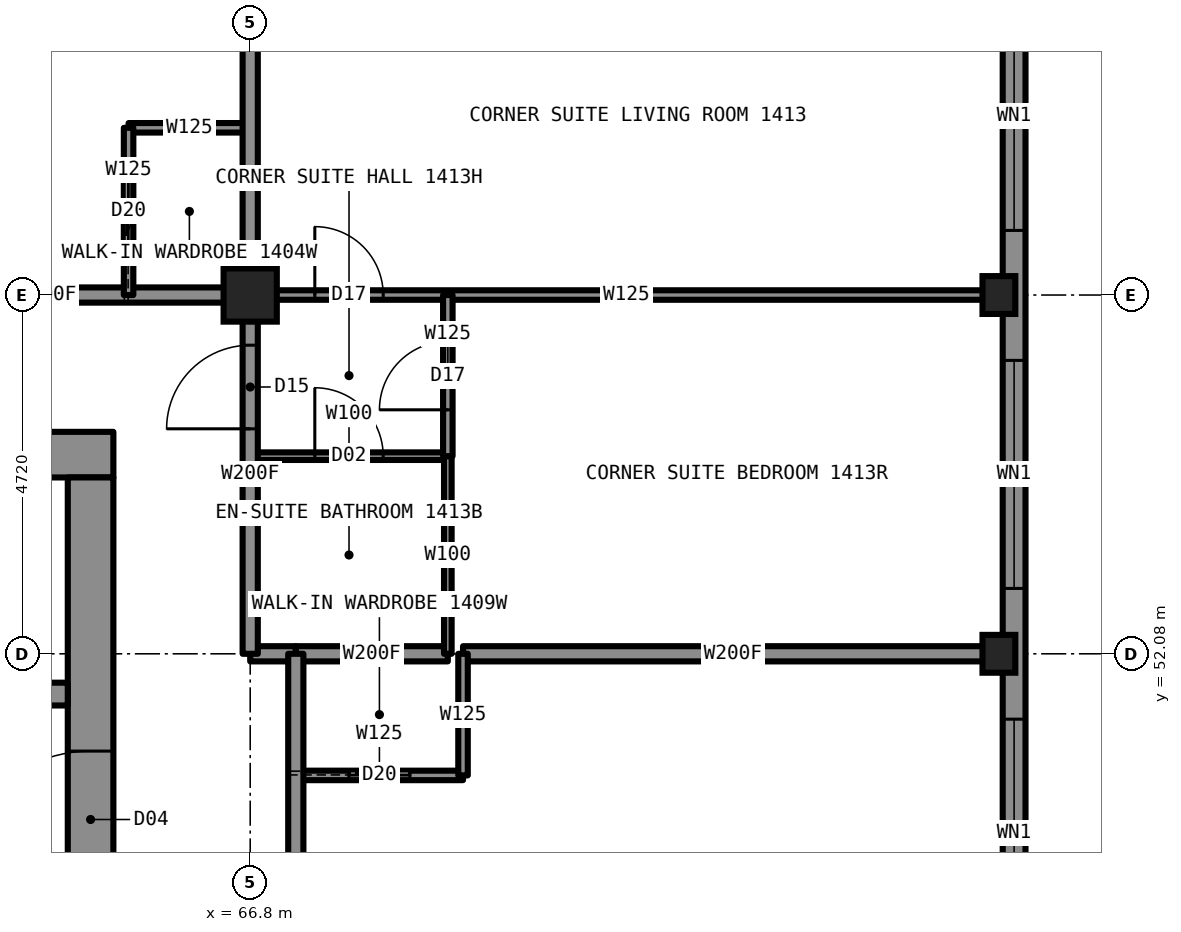
"""IFC4 building model, lengths in metres.
Left out: names, types, materials, properties, quantities, classifications, styles, units other than length and angle.
Written with IfcOpenShell. Run it as: python <this file> out.ifc"""

import sys

from ifc_helpers import new_model, si_unit, direction, frame, frame_2d, origin, origin_2d, place, context, subcontext, project, spatial, rectangle, hollow_rectangle, i_section, extrude, element, fill, save


model = new_model("IFC4")
c1 = context("Model", 3, precision=1e-05, world=origin(), true_north=direction((0.0, 1.0)))
c2 = subcontext(c1, "Body", "Model", "MODEL_VIEW")
j1 = project(units=[si_unit("LENGTHUNIT", "METRE"), si_unit("PLANEANGLEUNIT", "RADIAN")], contexts=[c1])
p1 = place(None, origin())
s1 = spatial("IfcSite", under=j1, at=p1, CompositionType="ELEMENT")
p2 = place(p1, origin())
s2 = spatial("IfcBuilding", under=s1, at=p2, CompositionType="ELEMENT")
p3 = place(p2, frame((0.0, 0.0, 49.5)))
s3 = spatial("IfcBuildingStorey", under=s2, at=p3, CompositionType="ELEMENT", Elevation=49.5)
for number, where, z_axis, x_axis in (
    (1, (76.65, 52.08, 0.0), (0.0, 0.0, 1.0), (1.0, 0.0, 0.0)),
    (2, (76.65, 56.8, 0.0), (0.0, 0.0, 1.0), (1.0, 0.0, 0.0)),
):
    element("IfcColumn", number, at=place(p3, frame(where, z_axis=z_axis, x_axis=x_axis)), inside=s3, PredefinedType="COLUMN", context=c2, shape_type="SweptSolid", body=[
        extrude(i_section(OverallWidth=0.432, OverallDepth=0.498, WebThickness=0.056, FlangeThickness=0.089, at=origin_2d()), origin(), (0.0, 0.0, 1.0), 3.5),
    ])
p4 = place(p3, frame((66.8, 56.8, 0.0), z_axis=(0.0, 0.0, 1.0), x_axis=(1.0, 0.0, 0.0)))
e3 = element("IfcColumn", 3, at=p4, inside=s3, PredefinedType="COLUMN", context=c2, shape_type="SweptSolid", body=[
    extrude(hollow_rectangle(XDim=0.7, YDim=0.7, WallThickness=0.06, at=origin_2d()), origin(), (0.0, 0.0, 1.0), 3.5),
])
p5 = place(p3, frame((45.0, 54.7, 0.0), z_axis=(0.0, 0.0, 1.0), x_axis=(1.0, 0.0, 0.0)))
e4 = element("IfcWall", 4, at=p5, inside=s3, PredefinedType="SHEAR", context=c2, shape_type="SweptSolid", body=[
    extrude(rectangle(XDim=20.0, YDim=0.6, at=frame_2d((10.0, 0.0))), origin(), (0.0, 0.0, 1.0), 3.5),
])
p6 = place(p3, frame((64.7, 35.6, 0.0), z_axis=(0.0, 0.0, 1.0), x_axis=(0.0, 1.0, 0.0)))
e5 = element("IfcWall", 5, at=p6, inside=s3, PredefinedType="SHEAR", context=c2, shape_type="SweptSolid", body=[
    extrude(rectangle(XDim=18.8, YDim=0.6, at=frame_2d((9.4, 0.0))), origin(), (0.0, 0.0, 1.0), 3.5),
])
p7 = place(p6, frame((13.4, 0.0, 0.0)))
e6 = element("IfcOpeningElement", 6, at=p7, cuts=e5, PredefinedType="OPENING", context=c2, shape_type="SweptSolid", body=[
    extrude(rectangle(XDim=1.8, YDim=2.2, at=frame_2d((0.9, 1.1))), frame((0.0, 0.31, 0.0), z_axis=(0.0, -1.0, 0.0), x_axis=(1.0, 0.0, 0.0)), (0.0, 0.0, 1.0), 0.62),
])
p8 = place(p6, frame((3.6, 0.0, 0.0)))
e7 = element("IfcOpeningElement", 7, at=p8, cuts=e5, PredefinedType="OPENING", context=c2, shape_type="SweptSolid", body=[
    extrude(rectangle(XDim=1.8, YDim=2.2, at=frame_2d((0.9, 1.1))), frame((0.0, 0.31, 0.0), z_axis=(0.0, -1.0, 0.0), x_axis=(1.0, 0.0, 0.0)), (0.0, 0.0, 1.0), 0.62),
])
p9 = place(p3, frame((45.6, 51.55, 0.0), z_axis=(0.0, 0.0, 1.0), x_axis=(1.0, 0.0, 0.0)))
e8 = element("IfcWall", 8, at=p9, inside=s3, PredefinedType="SHEAR", context=c2, shape_type="SweptSolid", body=[
    extrude(rectangle(XDim=18.8, YDim=0.3, at=frame_2d((9.4, 0.0))), origin(), (0.0, 0.0, 1.0), 3.5),
])
p10 = place(p9, frame((0.7, 0.0, 0.0)))
e9 = element("IfcOpeningElement", 9, at=p10, cuts=e8, PredefinedType="OPENING", context=c2, shape_type="SweptSolid", body=[
    extrude(rectangle(XDim=1.1, YDim=2.2, at=frame_2d((0.55, 1.1))), frame((0.0, 0.16, 0.0), z_axis=(0.0, -1.0, 0.0), x_axis=(1.0, 0.0, 0.0)), (0.0, 0.0, 1.0), 0.32),
])
p11 = place(p9, frame((3.4, 0.0, 0.0)))
e10 = element("IfcOpeningElement", 10, at=p11, cuts=e8, PredefinedType="OPENING", context=c2, shape_type="SweptSolid", body=[
    extrude(rectangle(XDim=1.1, YDim=2.2, at=frame_2d((0.55, 1.1))), frame((0.0, 0.16, 0.0), z_axis=(0.0, -1.0, 0.0), x_axis=(1.0, 0.0, 0.0)), (0.0, 0.0, 1.0), 0.32),
])
p12 = place(p9, frame((6.1, 0.0, 0.0)))
e11 = element("IfcOpeningElement", 11, at=p12, cuts=e8, PredefinedType="OPENING", context=c2, shape_type="SweptSolid", body=[
    extrude(rectangle(XDim=1.1, YDim=2.2, at=frame_2d((0.55, 1.1))), frame((0.0, 0.16, 0.0), z_axis=(0.0, -1.0, 0.0), x_axis=(1.0, 0.0, 0.0)), (0.0, 0.0, 1.0), 0.32),
])
p13 = place(p9, frame((8.8, 0.0, 0.0)))
e12 = element("IfcOpeningElement", 12, at=p13, cuts=e8, PredefinedType="OPENING", context=c2, shape_type="SweptSolid", body=[
    extrude(rectangle(XDim=1.1, YDim=2.2, at=frame_2d((0.55, 1.1))), frame((0.0, 0.16, 0.0), z_axis=(0.0, -1.0, 0.0), x_axis=(1.0, 0.0, 0.0)), (0.0, 0.0, 1.0), 0.32),
])
p14 = place(p9, frame((11.6, 0.0, 0.0)))
e13 = element("IfcOpeningElement", 13, at=p14, cuts=e8, PredefinedType="OPENING", context=c2, shape_type="SweptSolid", body=[
    extrude(rectangle(XDim=1.1, YDim=2.2, at=frame_2d((0.55, 1.1))), frame((0.0, 0.16, 0.0), z_axis=(0.0, -1.0, 0.0), x_axis=(1.0, 0.0, 0.0)), (0.0, 0.0, 1.0), 0.32),
])
p15 = place(p9, frame((14.3, 0.0, 0.0)))
e14 = element("IfcOpeningElement", 14, at=p15, cuts=e8, PredefinedType="OPENING", context=c2, shape_type="SweptSolid", body=[
    extrude(rectangle(XDim=1.1, YDim=2.2, at=frame_2d((0.55, 1.1))), frame((0.0, 0.16, 0.0), z_axis=(0.0, -1.0, 0.0), x_axis=(1.0, 0.0, 0.0)), (0.0, 0.0, 1.0), 0.32),
])
p16 = place(p3, frame((43.2, 56.8, 0.0), z_axis=(0.0, 0.0, 1.0), x_axis=(1.0, 0.0, 0.0)))
e15 = element("IfcWall", 15, at=p16, inside=s3, PredefinedType="PARTITIONING", context=c2, shape_type="SweptSolid", body=[
    extrude(rectangle(XDim=23.6, YDim=0.2, at=frame_2d((11.8, 0.0))), origin(), (0.0, 0.0, 1.0), 3.33),
])
p17 = place(p16, frame((1.46, 0.0, 0.0)))
e16 = element("IfcOpeningElement", 16, at=p17, cuts=e15, PredefinedType="OPENING", context=c2, shape_type="SweptSolid", body=[
    extrude(rectangle(XDim=1.0, YDim=2.2, at=frame_2d((0.5, 1.1))), frame((0.0, 0.11, 0.0), z_axis=(0.0, -1.0, 0.0), x_axis=(1.0, 0.0, 0.0)), (0.0, 0.0, 1.0), 0.22),
])
p18 = place(p16, frame((7.27, 0.0, 0.0)))
e17 = element("IfcOpeningElement", 17, at=p18, cuts=e15, PredefinedType="OPENING", context=c2, shape_type="SweptSolid", body=[
    extrude(rectangle(XDim=1.0, YDim=2.2, at=frame_2d((0.5, 1.1))), frame((0.0, 0.11, 0.0), z_axis=(0.0, -1.0, 0.0), x_axis=(1.0, 0.0, 0.0)), (0.0, 0.0, 1.0), 0.22),
])
p19 = place(p16, frame((11.7, 0.0, 0.0)))
e18 = element("IfcOpeningElement", 18, at=p19, cuts=e15, PredefinedType="OPENING", context=c2, shape_type="SweptSolid", body=[
    extrude(rectangle(XDim=1.0, YDim=2.2, at=frame_2d((0.5, 1.1))), frame((0.0, 0.11, 0.0), z_axis=(0.0, -1.0, 0.0), x_axis=(1.0, 0.0, 0.0)), (0.0, 0.0, 1.0), 0.22),
])
p20 = place(p16, frame((17.16, 0.0, 0.0)))
e19 = element("IfcOpeningElement", 19, at=p20, cuts=e15, PredefinedType="OPENING", context=c2, shape_type="SweptSolid", body=[
    extrude(rectangle(XDim=1.0, YDim=2.2, at=frame_2d((0.5, 1.1))), frame((0.0, 0.11, 0.0), z_axis=(0.0, -1.0, 0.0), x_axis=(1.0, 0.0, 0.0)), (0.0, 0.0, 1.0), 0.22),
])
p21 = place(p3, frame((66.8, 56.8, 0.0), z_axis=(0.0, 0.0, 1.0), x_axis=(1.0, 0.0, 0.0)))
e20 = element("IfcWall", 20, at=p21, inside=s3, PredefinedType="PARTITIONING", context=c2, shape_type="SweptSolid", body=[
    extrude(rectangle(XDim=9.9, YDim=0.125, at=frame_2d((4.95, 0.0))), origin(), (0.0, 0.0, 1.0), 2.573),
])
p22 = place(p21, frame((0.85, 0.0, 0.0)))
e21 = element("IfcOpeningElement", 21, at=p22, cuts=e20, PredefinedType="OPENING", context=c2, shape_type="SweptSolid", body=[
    extrude(rectangle(XDim=0.9, YDim=2.2, at=frame_2d((0.45, 1.1))), frame((0.0, 0.073, 0.0), z_axis=(0.0, -1.0, 0.0), x_axis=(1.0, 0.0, 0.0)), (0.0, 0.0, 1.0), 0.145),
])
p23 = place(p3, frame((65.2, 59.0, 0.0), z_axis=(0.0, 0.0, 1.0), x_axis=(1.0, 0.0, 0.0)))
e22 = element("IfcWall", 22, at=p23, inside=s3, PredefinedType="PARTITIONING", context=c2, shape_type="SweptSolid", body=[
    extrude(rectangle(XDim=1.6, YDim=0.125, at=frame_2d((0.8, 0.0))), origin(), (0.0, 0.0, 1.0), 3.33),
])
p24 = place(p3, frame((67.4, 50.48, 0.0), z_axis=(0.0, 0.0, 1.0), x_axis=(1.0, 0.0, 0.0)))
e23 = element("IfcWall", 23, at=p24, inside=s3, PredefinedType="PARTITIONING", context=c2, shape_type="SweptSolid", body=[
    extrude(rectangle(XDim=2.2, YDim=0.125, at=frame_2d((1.1, 0.0))), origin(), (0.0, 0.0, 1.0), 3.33),
])
p25 = place(p24, frame((0.7, 0.0, 0.0)))
e24 = element("IfcOpeningElement", 24, at=p25, cuts=e23, PredefinedType="OPENING", context=c2, shape_type="SweptSolid", body=[
    extrude(rectangle(XDim=0.8, YDim=2.1, at=frame_2d((0.4, 1.05))), frame((0.0, 0.073, 0.0), z_axis=(0.0, -1.0, 0.0), x_axis=(1.0, 0.0, 0.0)), (0.0, 0.0, 1.0), 0.145),
])
p26 = place(p3, frame((66.8, 52.08, 0.0), z_axis=(0.0, 0.0, 1.0), x_axis=(1.0, 0.0, 0.0)))
e25 = element("IfcWall", 25, at=p26, inside=s3, PredefinedType="PARTITIONING", context=c2, shape_type="SweptSolid", body=[
    extrude(rectangle(XDim=0.6, YDim=0.2, at=frame_2d((0.3, 0.0))), origin(), (0.0, 0.0, 1.0), 2.573),
])
p27 = place(p3, frame((67.4, 52.08, 0.0), z_axis=(0.0, 0.0, 1.0), x_axis=(1.0, 0.0, 0.0)))
e26 = element("IfcWall", 26, at=p27, inside=s3, PredefinedType="PARTITIONING", context=c2, shape_type="SweptSolid", body=[
    extrude(rectangle(XDim=2.0, YDim=0.2, at=frame_2d((1.0, 0.0))), origin(), (0.0, 0.0, 1.0), 2.573),
])
p28 = place(p3, frame((69.6, 52.08, 0.0), z_axis=(0.0, 0.0, 1.0), x_axis=(1.0, 0.0, 0.0)))
e27 = element("IfcWall", 27, at=p28, inside=s3, PredefinedType="PARTITIONING", context=c2, shape_type="SweptSolid", body=[
    extrude(rectangle(XDim=7.1, YDim=0.2, at=frame_2d((3.55, 0.0))), origin(), (0.0, 0.0, 1.0), 2.573),
])
p29 = place(p3, frame((66.8, 54.68, 0.0), z_axis=(0.0, 0.0, 1.0), x_axis=(1.0, 0.0, 0.0)))
e28 = element("IfcWall", 28, at=p29, inside=s3, PredefinedType="PARTITIONING", context=c2, shape_type="SweptSolid", body=[
    extrude(rectangle(XDim=2.6, YDim=0.1, at=frame_2d((1.3, 0.0))), origin(), (0.0, 0.0, 1.0), 3.33),
])
p30 = place(p29, frame((0.85, 0.0, 0.0)))
e29 = element("IfcOpeningElement", 29, at=p30, cuts=e28, PredefinedType="OPENING", context=c2, shape_type="SweptSolid", body=[
    extrude(rectangle(XDim=0.9, YDim=2.1, at=frame_2d((0.45, 1.05))), frame((0.0, 0.06, 0.0), z_axis=(0.0, -1.0, 0.0), x_axis=(1.0, 0.0, 0.0)), (0.0, 0.0, 1.0), 0.12),
])
p31 = place(p3, frame((65.2, 56.8, 0.0), z_axis=(0.0, 0.0, 1.0), x_axis=(0.0, 1.0, 0.0)))
e30 = element("IfcWall", 30, at=p31, inside=s3, PredefinedType="PARTITIONING", context=c2, shape_type="SweptSolid", body=[
    extrude(rectangle(XDim=2.2, YDim=0.125, at=frame_2d((1.1, 0.0))), origin(), (0.0, 0.0, 1.0), 3.33),
])
p32 = place(p31, frame((0.7, 0.0, 0.0)))
e31 = element("IfcOpeningElement", 31, at=p32, cuts=e30, PredefinedType="OPENING", context=c2, shape_type="SweptSolid", body=[
    extrude(rectangle(XDim=0.8, YDim=2.1, at=frame_2d((0.4, 1.05))), frame((0.0, 0.073, 0.0), z_axis=(0.0, -1.0, 0.0), x_axis=(1.0, 0.0, 0.0)), (0.0, 0.0, 1.0), 0.145),
])
p33 = place(p3, frame((66.8, 52.08, 0.0), z_axis=(0.0, 0.0, 1.0), x_axis=(0.0, 1.0, 0.0)))
e32 = element("IfcWall", 32, at=p33, inside=s3, PredefinedType="PARTITIONING", context=c2, shape_type="SweptSolid", body=[
    extrude(rectangle(XDim=4.72, YDim=0.2, at=frame_2d((2.36, 0.0))), origin(), (0.0, 0.0, 1.0), 3.33),
])
p34 = place(p33, frame((2.96, 0.0, 0.0)))
e33 = element("IfcOpeningElement", 33, at=p34, cuts=e32, PredefinedType="OPENING", context=c2, shape_type="SweptSolid", body=[
    extrude(rectangle(XDim=1.1, YDim=2.2, at=frame_2d((0.55, 1.1))), frame((0.0, 0.11, 0.0), z_axis=(0.0, -1.0, 0.0), x_axis=(1.0, 0.0, 0.0)), (0.0, 0.0, 1.0), 0.22),
])
p35 = place(p3, frame((66.8, 56.8, 0.0), z_axis=(0.0, 0.0, 1.0), x_axis=(0.0, 1.0, 0.0)))
e34 = element("IfcWall", 34, at=p35, inside=s3, PredefinedType="PARTITIONING", context=c2, shape_type="SweptSolid", body=[
    extrude(rectangle(XDim=9.9, YDim=0.2, at=frame_2d((4.95, 0.0))), origin(), (0.0, 0.0, 1.0), 2.573),
])
p36 = place(p3, frame((67.4, 37.92, 0.0), z_axis=(0.0, 0.0, 1.0), x_axis=(0.0, 1.0, 0.0)))
e35 = element("IfcWall", 35, at=p36, inside=s3, PredefinedType="PARTITIONING", context=c2, shape_type="SweptSolid", body=[
    extrude(rectangle(XDim=14.16, YDim=0.2, at=frame_2d((7.08, 0.0))), origin(), (0.0, 0.0, 1.0), 3.33),
])
p37 = place(p36, frame((3.15, 0.0, 0.0)))
e36 = element("IfcOpeningElement", 36, at=p37, cuts=e35, PredefinedType="OPENING", context=c2, shape_type="SweptSolid", body=[
    extrude(rectangle(XDim=1.0, YDim=2.2, at=frame_2d((0.5, 1.1))), frame((0.0, 0.11, 0.0), z_axis=(0.0, -1.0, 0.0), x_axis=(1.0, 0.0, 0.0)), (0.0, 0.0, 1.0), 0.22),
])
p38 = place(p36, frame((7.72, 0.0, 0.0)))
e37 = element("IfcOpeningElement", 37, at=p38, cuts=e35, PredefinedType="OPENING", context=c2, shape_type="SweptSolid", body=[
    extrude(rectangle(XDim=1.0, YDim=2.2, at=frame_2d((0.5, 1.1))), frame((0.0, 0.11, 0.0), z_axis=(0.0, -1.0, 0.0), x_axis=(1.0, 0.0, 0.0)), (0.0, 0.0, 1.0), 0.22),
])
p39 = place(p3, frame((69.4, 52.08, 0.0), z_axis=(0.0, 0.0, 1.0), x_axis=(0.0, 1.0, 0.0)))
e38 = element("IfcWall", 38, at=p39, inside=s3, PredefinedType="PARTITIONING", context=c2, shape_type="SweptSolid", body=[
    extrude(rectangle(XDim=2.6, YDim=0.1, at=frame_2d((1.3, 0.0))), origin(), (0.0, 0.0, 1.0), 3.33),
])
p40 = place(p3, frame((69.4, 54.68, 0.0), z_axis=(0.0, 0.0, 1.0), x_axis=(0.0, 1.0, 0.0)))
e39 = element("IfcWall", 39, at=p40, inside=s3, PredefinedType="PARTITIONING", context=c2, shape_type="SweptSolid", body=[
    extrude(rectangle(XDim=2.12, YDim=0.125, at=frame_2d((1.06, 0.0))), origin(), (0.0, 0.0, 1.0), 3.33),
])
p41 = place(p40, frame((0.61, 0.0, 0.0)))
e40 = element("IfcOpeningElement", 40, at=p41, cuts=e39, PredefinedType="OPENING", context=c2, shape_type="SweptSolid", body=[
    extrude(rectangle(XDim=0.9, YDim=2.2, at=frame_2d((0.45, 1.1))), frame((0.0, 0.073, 0.0), z_axis=(0.0, -1.0, 0.0), x_axis=(1.0, 0.0, 0.0)), (0.0, 0.0, 1.0), 0.145),
])
p42 = place(p3, frame((69.6, 50.48, 0.0), z_axis=(0.0, 0.0, 1.0), x_axis=(0.0, 1.0, 0.0)))
e41 = element("IfcWall", 41, at=p42, inside=s3, PredefinedType="PARTITIONING", context=c2, shape_type="SweptSolid", body=[
    extrude(rectangle(XDim=1.6, YDim=0.125, at=frame_2d((0.8, 0.0))), origin(), (0.0, 0.0, 1.0), 3.33),
])
p43 = place(p3, frame((76.85, 28.5, 0.0), z_axis=(0.0, 0.0, 1.0), x_axis=(0.0, 1.0, 0.0)))
e42 = element("IfcWall", 42, at=p43, inside=s3, PredefinedType="SOLIDWALL", context=c2, shape_type="SweptSolid", body=[
    extrude(rectangle(XDim=33.0, YDim=0.3, at=frame_2d((16.5, 0.0))), origin(), (0.0, 0.0, 1.0), 2.83),
])
p44 = place(p43, frame((0.85, 0.0, 0.5)))
e43 = element("IfcOpeningElement", 43, at=p44, cuts=e42, PredefinedType="OPENING", context=c2, shape_type="SweptSolid", body=[
    extrude(rectangle(XDim=3.0, YDim=2.0, at=frame_2d((1.5, 1.0))), frame((0.0, 0.16, 0.0), z_axis=(0.0, -1.0, 0.0), x_axis=(1.0, 0.0, 0.0)), (0.0, 0.0, 1.0), 0.32),
])
p45 = place(p43, frame((5.56, 0.0, 0.5)))
e44 = element("IfcOpeningElement", 44, at=p45, cuts=e42, PredefinedType="OPENING", context=c2, shape_type="SweptSolid", body=[
    extrude(rectangle(XDim=3.0, YDim=2.0, at=frame_2d((1.5, 1.0))), frame((0.0, 0.16, 0.0), z_axis=(0.0, -1.0, 0.0), x_axis=(1.0, 0.0, 0.0)), (0.0, 0.0, 1.0), 0.32),
])
p46 = place(p43, frame((10.28, 0.0, 1.1)))
e45 = element("IfcOpeningElement", 45, at=p46, cuts=e42, PredefinedType="OPENING", context=c2, shape_type="SweptSolid", body=[
    extrude(rectangle(XDim=1.1, YDim=1.4, at=frame_2d((0.55, 0.7))), frame((0.0, 0.16, 0.0), z_axis=(0.0, -1.0, 0.0), x_axis=(1.0, 0.0, 0.0)), (0.0, 0.0, 1.0), 0.32),
])
p47 = place(p43, frame((15.0, 0.0, 0.5)))
e46 = element("IfcOpeningElement", 46, at=p47, cuts=e42, PredefinedType="OPENING", context=c2, shape_type="SweptSolid", body=[
    extrude(rectangle(XDim=3.0, YDim=2.0, at=frame_2d((1.5, 1.0))), frame((0.0, 0.16, 0.0), z_axis=(0.0, -1.0, 0.0), x_axis=(1.0, 0.0, 0.0)), (0.0, 0.0, 1.0), 0.32),
])
p48 = place(p43, frame((21.62, 0.0, 1.1)))
e47 = element("IfcOpeningElement", 47, at=p48, cuts=e42, PredefinedType="OPENING", context=c2, shape_type="SweptSolid", body=[
    extrude(rectangle(XDim=1.1, YDim=1.4, at=frame_2d((0.55, 0.7))), frame((0.0, 0.16, 0.0), z_axis=(0.0, -1.0, 0.0), x_axis=(1.0, 0.0, 0.0)), (0.0, 0.0, 1.0), 0.32),
])
p49 = place(p43, frame((24.44, 0.0, 0.5)))
e48 = element("IfcOpeningElement", 48, at=p49, cuts=e42, PredefinedType="OPENING", context=c2, shape_type="SweptSolid", body=[
    extrude(rectangle(XDim=3.0, YDim=2.0, at=frame_2d((1.5, 1.0))), frame((0.0, 0.16, 0.0), z_axis=(0.0, -1.0, 0.0), x_axis=(1.0, 0.0, 0.0)), (0.0, 0.0, 1.0), 0.32),
])
p50 = place(p43, frame((29.15, 0.0, 0.5)))
e49 = element("IfcOpeningElement", 49, at=p50, cuts=e42, PredefinedType="OPENING", context=c2, shape_type="SweptSolid", body=[
    extrude(rectangle(XDim=3.0, YDim=2.0, at=frame_2d((1.5, 1.0))), frame((0.0, 0.16, 0.0), z_axis=(0.0, -1.0, 0.0), x_axis=(1.0, 0.0, 0.0)), (0.0, 0.0, 1.0), 0.32),
])
p51 = place(p32, origin())
e50 = element("IfcDoor", 50, at=p51, inside=s3, OperationType="SLIDING_TO_LEFT", PredefinedType="DOOR", context=c2, shape_type="SweptSolid", body=[
    extrude(rectangle(XDim=0.8, YDim=2.1, at=frame_2d((0.4, 1.05))), frame((0.0, 0.025, 0.0), z_axis=(0.0, -1.0, 0.0), x_axis=(1.0, 0.0, 0.0)), (0.0, 0.0, 1.0), 0.05),
])
fill(e31, e50)
p52 = place(p25, origin())
e51 = element("IfcDoor", 51, at=p52, inside=s3, OperationType="SLIDING_TO_LEFT", PredefinedType="DOOR", context=c2, shape_type="SweptSolid", body=[
    extrude(rectangle(XDim=0.8, YDim=2.1, at=frame_2d((0.4, 1.05))), frame((0.0, 0.025, 0.0), z_axis=(0.0, -1.0, 0.0), x_axis=(1.0, 0.0, 0.0)), (0.0, 0.0, 1.0), 0.05),
])
fill(e24, e51)
p53 = place(p22, origin())
e52 = element("IfcDoor", 52, at=p53, inside=s3, OperationType="SINGLE_SWING_LEFT", PredefinedType="DOOR", context=c2, shape_type="SweptSolid", body=[
    extrude(rectangle(XDim=0.9, YDim=2.2, at=frame_2d((0.45, 1.1))), frame((0.0, 0.025, 0.0), z_axis=(0.0, -1.0, 0.0), x_axis=(1.0, 0.0, 0.0)), (0.0, 0.0, 1.0), 0.05),
])
fill(e21, e52)
p54 = place(p30, origin())
e53 = element("IfcDoor", 53, at=p54, inside=s3, OperationType="SINGLE_SWING_RIGHT", PredefinedType="DOOR", context=c2, shape_type="SweptSolid", body=[
    extrude(rectangle(XDim=0.9, YDim=2.1, at=frame_2d((0.45, 1.05))), frame((0.0, 0.025, 0.0), z_axis=(0.0, -1.0, 0.0), x_axis=(1.0, 0.0, 0.0)), (0.0, 0.0, 1.0), 0.05),
])
fill(e29, e53)
p55 = place(p34, origin())
e54 = element("IfcDoor", 54, at=p55, inside=s3, OperationType="SINGLE_SWING_LEFT", PredefinedType="DOOR", context=c2, shape_type="SweptSolid", body=[
    extrude(rectangle(XDim=1.1, YDim=2.2, at=frame_2d((0.55, 1.1))), frame((0.0, 0.025, 0.0), z_axis=(0.0, -1.0, 0.0), x_axis=(1.0, 0.0, 0.0)), (0.0, 0.0, 1.0), 0.05),
])
fill(e33, e54)
p56 = place(p41, origin())
e55 = element("IfcDoor", 55, at=p56, inside=s3, OperationType="SINGLE_SWING_LEFT", PredefinedType="DOOR", context=c2, shape_type="SweptSolid", body=[
    extrude(rectangle(XDim=0.9, YDim=2.2, at=frame_2d((0.45, 1.1))), frame((0.0, 0.025, 0.0), z_axis=(0.0, -1.0, 0.0), x_axis=(1.0, 0.0, 0.0)), (0.0, 0.0, 1.0), 0.05),
])
fill(e40, e55)
p57 = place(p48, origin())
e56 = element("IfcWindow", 56, at=p57, inside=s3, PartitioningType="SINGLE_PANEL", PredefinedType="WINDOW", context=c2, shape_type="SweptSolid", body=[
    extrude(rectangle(XDim=1.1, YDim=1.4, at=frame_2d((0.55, 0.7))), frame((0.0, 0.03, 0.0), z_axis=(0.0, -1.0, 0.0), x_axis=(1.0, 0.0, 0.0)), (0.0, 0.0, 1.0), 0.06),
])
fill(e47, e56)
p58 = place(p49, origin())
e57 = element("IfcWindow", 57, at=p58, inside=s3, PartitioningType="SINGLE_PANEL", PredefinedType="WINDOW", context=c2, shape_type="SweptSolid", body=[
    extrude(rectangle(XDim=3.0, YDim=2.0, at=frame_2d((1.5, 1.0))), frame((0.0, 0.03, 0.0), z_axis=(0.0, -1.0, 0.0), x_axis=(1.0, 0.0, 0.0)), (0.0, 0.0, 1.0), 0.06),
])
fill(e48, e57)
p59 = place(p50, origin())
e58 = element("IfcWindow", 58, at=p59, inside=s3, PartitioningType="SINGLE_PANEL", PredefinedType="WINDOW", context=c2, shape_type="SweptSolid", body=[
    extrude(rectangle(XDim=3.0, YDim=2.0, at=frame_2d((1.5, 1.0))), frame((0.0, 0.03, 0.0), z_axis=(0.0, -1.0, 0.0), x_axis=(1.0, 0.0, 0.0)), (0.0, 0.0, 1.0), 0.06),
])
fill(e49, e58)
p60 = place(p7, origin())
e59 = element("IfcDoor", 59, at=p60, inside=s3, OperationType="DOUBLE_DOOR_SINGLE_SWING", PredefinedType="DOOR", context=c2, shape_type="SweptSolid", body=[
    extrude(rectangle(XDim=1.8, YDim=2.2, at=frame_2d((0.9, 1.1))), frame((0.0, 0.025, 0.0), z_axis=(0.0, -1.0, 0.0), x_axis=(1.0, 0.0, 0.0)), (0.0, 0.0, 1.0), 0.05),
])
fill(e6, e59)
save(model, sys.argv[1])
